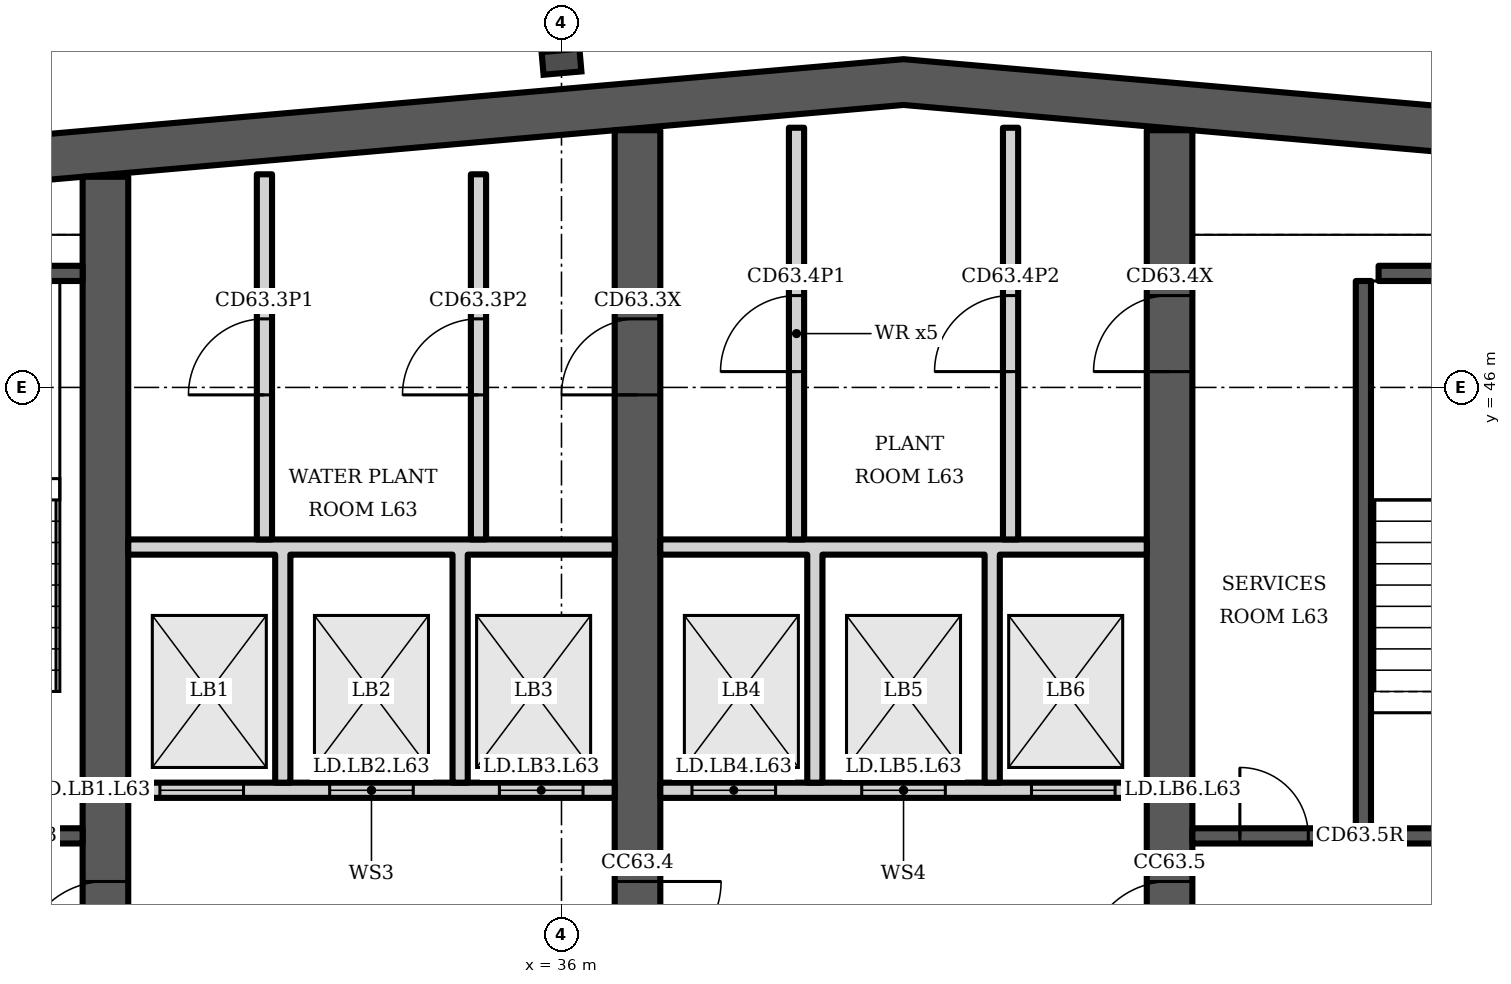
"""IFC4 building model, lengths in metres.
Left out: names, types, materials, properties, quantities, classifications, styles, units other than length and angle.
Written with IfcOpenShell. Run it as: python <this file> out.ifc"""

import sys

from ifc_helpers import new_model, si_unit, direction, frame, frame_2d, origin, origin_2d, place, context, subcontext, project, spatial, polyline, rectangle, i_section, outline, extrude, element, fill, save


model = new_model("IFC4")
c1 = context("Model", 3, precision=1e-05, world=origin(), true_north=direction((0.0, 1.0)))
c2 = subcontext(c1, "Body", "Model", "MODEL_VIEW")
j1 = project(units=[si_unit("LENGTHUNIT", "METRE"), si_unit("PLANEANGLEUNIT", "RADIAN")], contexts=[c1])
p1 = place(None, origin())
s1 = spatial("IfcSite", under=j1, at=p1, CompositionType="ELEMENT")
p2 = place(p1, origin())
s2 = spatial("IfcBuilding", under=s1, at=p2, CompositionType="ELEMENT")
p3 = place(p2, frame((0.0, 0.0, 250.3)))
s3 = spatial("IfcBuildingStorey", under=s2, at=p3, CompositionType="ELEMENT", Elevation=250.3)
p4 = place(p3, frame((0.0, 0.0, -0.0)))
e1 = element("IfcWall", 1, at=p4, inside=s3, PredefinedType="SHEAR", context=c2, shape_type="SweptSolid", body=[
    extrude(outline(polyline([(23.0, 48.185), (40.5, 49.716), (58.0, 48.185), (58.0, 48.787), (40.5, 50.318), (23.0, 48.787), (23.0, 48.185)])), origin(), (0.0, 0.0, 1.0), 3.6),
])
p5 = place(p3, frame((30.0, 34.6, 0.0), z_axis=(0.0, 0.0, 1.0), x_axis=(0.0, 1.0, 0.0)))
e2 = element("IfcWall", 2, at=p5, inside=s3, PredefinedType="SHEAR", context=c2, shape_type="SweptSolid", body=[
    extrude(rectangle(XDim=14.171, YDim=0.6, at=frame_2d((7.085, 0.0))), origin(), (0.0, 0.0, 1.0), 3.6),
])
p6 = place(p5, frame((3.8, 0.0, 0.0)))
e3 = element("IfcOpeningElement", 3, at=p6, cuts=e2, PredefinedType="OPENING", context=c2, shape_type="SweptSolid", body=[
    extrude(rectangle(XDim=1.1, YDim=2.1, at=frame_2d((0.55, 1.05))), frame((0.0, 0.31, 0.0), z_axis=(0.0, -1.0, 0.0), x_axis=(1.0, 0.0, 0.0)), (0.0, 0.0, 1.0), 0.62),
])
p7 = place(p3, frame((37.0, 34.6, 0.0), z_axis=(0.0, 0.0, 1.0), x_axis=(0.0, 1.0, 0.0)))
e4 = element("IfcWall", 4, at=p7, inside=s3, PredefinedType="SHEAR", context=c2, shape_type="SweptSolid", body=[
    extrude(rectangle(XDim=14.784, YDim=0.6, at=frame_2d((7.392, 0.0))), origin(), (0.0, 0.0, 1.0), 3.6),
])
p8 = place(p7, frame((11.302, 0.0, 0.0)))
e5 = element("IfcOpeningElement", 5, at=p8, cuts=e4, PredefinedType="OPENING", context=c2, shape_type="SweptSolid", body=[
    extrude(rectangle(XDim=1.0, YDim=2.1, at=frame_2d((0.5, 1.05))), frame((0.0, 0.31, 0.0), z_axis=(0.0, -1.0, 0.0), x_axis=(1.0, 0.0, 0.0)), (0.0, 0.0, 1.0), 0.62),
])
p9 = place(p7, frame((3.8, 0.0, 0.0)))
e6 = element("IfcOpeningElement", 6, at=p9, cuts=e4, PredefinedType="OPENING", context=c2, shape_type="SweptSolid", body=[
    extrude(rectangle(XDim=1.1, YDim=2.1, at=frame_2d((0.55, 1.05))), frame((0.0, 0.31, 0.0), z_axis=(0.0, -1.0, 0.0), x_axis=(1.0, 0.0, 0.0)), (0.0, 0.0, 1.0), 0.62),
])
p10 = place(p3, frame((44.0, 34.6, 0.0), z_axis=(0.0, 0.0, 1.0), x_axis=(0.0, 1.0, 0.0)))
e7 = element("IfcWall", 7, at=p10, inside=s3, PredefinedType="SHEAR", context=c2, shape_type="SweptSolid", body=[
    extrude(rectangle(XDim=14.784, YDim=0.6, at=frame_2d((7.392, 0.0))), origin(), (0.0, 0.0, 1.0), 3.6),
])
p11 = place(p10, frame((11.608, 0.0, 0.0)))
e8 = element("IfcOpeningElement", 8, at=p11, cuts=e7, PredefinedType="OPENING", context=c2, shape_type="SweptSolid", body=[
    extrude(rectangle(XDim=1.0, YDim=2.1, at=frame_2d((0.5, 1.05))), frame((0.0, 0.31, 0.0), z_axis=(0.0, -1.0, 0.0), x_axis=(1.0, 0.0, 0.0)), (0.0, 0.0, 1.0), 0.62),
])
p12 = place(p10, frame((3.8, 0.0, 0.0)))
e9 = element("IfcOpeningElement", 9, at=p12, cuts=e7, PredefinedType="OPENING", context=c2, shape_type="SweptSolid", body=[
    extrude(rectangle(XDim=1.1, YDim=2.1, at=frame_2d((0.55, 1.05))), frame((0.0, 0.31, 0.0), z_axis=(0.0, -1.0, 0.0), x_axis=(1.0, 0.0, 0.0)), (0.0, 0.0, 1.0), 0.62),
])
p13 = place(p3, frame((36.0, 50.285, 0.0), z_axis=(0.0, 0.0, 1.0), x_axis=(-0.087156, 0.996197, 0.0)))
e10 = element("IfcColumn", 10, at=p13, inside=s3, PredefinedType="COLUMN", context=c2, shape_type="SweptSolid", body=[
    extrude(i_section(OverallWidth=0.3, OverallDepth=0.5, WebThickness=0.014, FlangeThickness=0.028, FilletRadius=0.027, at=origin_2d()), origin(), (0.0, 0.0, 1.0), 3.6),
])
p14 = place(p3, frame((23.6, 40.1, 0.0), z_axis=(0.0, 0.0, 1.0), x_axis=(1.0, 0.0, 0.0)))
e11 = element("IfcWall", 11, at=p14, inside=s3, PredefinedType="SHEAR", context=c2, shape_type="SweptSolid", body=[
    extrude(rectangle(XDim=6.1, YDim=0.2, at=frame_2d((3.05, 0.0))), origin(), (0.0, 0.0, 1.0), 3.2),
])
p15 = place(p14, frame((3.325, 0.0, 0.0)))
e12 = element("IfcOpeningElement", 12, at=p15, cuts=e11, PredefinedType="OPENING", context=c2, shape_type="SweptSolid", body=[
    extrude(rectangle(XDim=1.2, YDim=2.1, at=frame_2d((0.6, 1.05))), frame((0.0, 0.11, 0.0), z_axis=(0.0, -1.0, 0.0), x_axis=(1.0, 0.0, 0.0)), (0.0, 0.0, 1.0), 0.22),
])
p16 = place(p14, frame((0.475, 0.0, 0.0)))
e13 = element("IfcOpeningElement", 13, at=p16, cuts=e11, PredefinedType="OPENING", context=c2, shape_type="SweptSolid", body=[
    extrude(rectangle(XDim=0.9, YDim=2.1, at=frame_2d((0.45, 1.05))), frame((0.0, 0.11, 0.0), z_axis=(0.0, -1.0, 0.0), x_axis=(1.0, 0.0, 0.0)), (0.0, 0.0, 1.0), 0.22),
])
p17 = place(p3, frame((25.75, 47.5, 0.0), z_axis=(0.0, 0.0, 1.0), x_axis=(1.0, 0.0, 0.0)))
e14 = element("IfcWall", 14, at=p17, inside=s3, PredefinedType="SHEAR", context=c2, shape_type="SweptSolid", body=[
    extrude(rectangle(XDim=3.95, YDim=0.2, at=frame_2d((1.975, 0.0))), origin(), (0.0, 0.0, 1.0), 3.2),
])
p18 = place(p3, frame((30.3, 40.7, 0.0), z_axis=(0.0, 0.0, 1.0), x_axis=(1.0, 0.0, 0.0)))
e15 = element("IfcWall", 15, at=p18, inside=s3, PredefinedType="PARTITIONING", context=c2, shape_type="SweptSolid", body=[
    extrude(rectangle(XDim=6.4, YDim=0.2, at=frame_2d((3.2, 0.0))), origin(), (0.0, 0.0, 1.0), 3.2),
])
p19 = place(p18, frame((0.417, 0.0, 0.0)))
e16 = element("IfcOpeningElement", 16, at=p19, cuts=e15, PredefinedType="OPENING", context=c2, shape_type="SweptSolid", body=[
    extrude(rectangle(XDim=1.1, YDim=2.1, at=frame_2d((0.55, 1.05))), frame((0.0, 0.11, 0.0), z_axis=(0.0, -1.0, 0.0), x_axis=(1.0, 0.0, 0.0)), (0.0, 0.0, 1.0), 0.22),
])
p20 = place(p18, frame((2.65, 0.0, 0.0)))
e17 = element("IfcOpeningElement", 17, at=p20, cuts=e15, PredefinedType="OPENING", context=c2, shape_type="SweptSolid", body=[
    extrude(rectangle(XDim=1.1, YDim=2.1, at=frame_2d((0.55, 1.05))), frame((0.0, 0.11, 0.0), z_axis=(0.0, -1.0, 0.0), x_axis=(1.0, 0.0, 0.0)), (0.0, 0.0, 1.0), 0.22),
])
p21 = place(p18, frame((4.883, 0.0, 0.0)))
e18 = element("IfcOpeningElement", 18, at=p21, cuts=e15, PredefinedType="OPENING", context=c2, shape_type="SweptSolid", body=[
    extrude(rectangle(XDim=1.1, YDim=2.1, at=frame_2d((0.55, 1.05))), frame((0.0, 0.11, 0.0), z_axis=(0.0, -1.0, 0.0), x_axis=(1.0, 0.0, 0.0)), (0.0, 0.0, 1.0), 0.22),
])
p22 = place(p3, frame((0.0, 0.0, -0.0)))
e19 = element("IfcWall", 19, at=p22, inside=s3, PredefinedType="PARTITIONING", context=c2, shape_type="SweptSolid", body=[
    extrude(outline(polyline([(32.433, 40.8), (32.233, 40.8), (32.233, 43.8), (30.3, 43.8), (30.3, 44.0), (36.7, 44.0), (36.7, 43.8), (34.767, 43.8), (34.767, 40.8), (34.567, 40.8), (34.567, 43.8), (32.433, 43.8), (32.433, 40.8)])), origin(), (0.0, 0.0, 1.0), 3.2),
])
p23 = place(p3, frame((32.092, 44.0, 0.0), z_axis=(0.0, 0.0, 1.0), x_axis=(0.0, 1.0, 0.0)))
e20 = element("IfcWall", 20, at=p23, inside=s3, PredefinedType="PARTITIONING", context=c2, shape_type="SweptSolid", body=[
    extrude(rectangle(XDim=4.804, YDim=0.2, at=frame_2d((2.402, 0.0))), origin(), (0.0, 0.0, 1.0), 3.2),
])
p24 = place(p23, frame((1.902, 0.0, 0.0)))
e21 = element("IfcOpeningElement", 21, at=p24, cuts=e20, PredefinedType="OPENING", context=c2, shape_type="SweptSolid", body=[
    extrude(rectangle(XDim=1.0, YDim=2.1, at=frame_2d((0.5, 1.05))), frame((0.0, 0.11, 0.0), z_axis=(0.0, -1.0, 0.0), x_axis=(1.0, 0.0, 0.0)), (0.0, 0.0, 1.0), 0.22),
])
p25 = place(p3, frame((34.908, 44.0, 0.0), z_axis=(0.0, 0.0, 1.0), x_axis=(0.0, 1.0, 0.0)))
e22 = element("IfcWall", 22, at=p25, inside=s3, PredefinedType="PARTITIONING", context=c2, shape_type="SweptSolid", body=[
    extrude(rectangle(XDim=4.804, YDim=0.2, at=frame_2d((2.402, 0.0))), origin(), (0.0, 0.0, 1.0), 3.2),
])
p26 = place(p25, frame((1.902, 0.0, 0.0)))
e23 = element("IfcOpeningElement", 23, at=p26, cuts=e22, PredefinedType="OPENING", context=c2, shape_type="SweptSolid", body=[
    extrude(rectangle(XDim=1.0, YDim=2.1, at=frame_2d((0.5, 1.05))), frame((0.0, 0.11, 0.0), z_axis=(0.0, -1.0, 0.0), x_axis=(1.0, 0.0, 0.0)), (0.0, 0.0, 1.0), 0.22),
])
p27 = place(p3, frame((37.3, 40.7, 0.0), z_axis=(0.0, 0.0, 1.0), x_axis=(1.0, 0.0, 0.0)))
e24 = element("IfcWall", 24, at=p27, inside=s3, PredefinedType="PARTITIONING", context=c2, shape_type="SweptSolid", body=[
    extrude(rectangle(XDim=6.4, YDim=0.2, at=frame_2d((3.2, 0.0))), origin(), (0.0, 0.0, 1.0), 3.2),
])
p28 = place(p27, frame((0.417, 0.0, 0.0)))
e25 = element("IfcOpeningElement", 25, at=p28, cuts=e24, PredefinedType="OPENING", context=c2, shape_type="SweptSolid", body=[
    extrude(rectangle(XDim=1.1, YDim=2.1, at=frame_2d((0.55, 1.05))), frame((0.0, 0.11, 0.0), z_axis=(0.0, -1.0, 0.0), x_axis=(1.0, 0.0, 0.0)), (0.0, 0.0, 1.0), 0.22),
])
p29 = place(p27, frame((2.65, 0.0, 0.0)))
e26 = element("IfcOpeningElement", 26, at=p29, cuts=e24, PredefinedType="OPENING", context=c2, shape_type="SweptSolid", body=[
    extrude(rectangle(XDim=1.1, YDim=2.1, at=frame_2d((0.55, 1.05))), frame((0.0, 0.11, 0.0), z_axis=(0.0, -1.0, 0.0), x_axis=(1.0, 0.0, 0.0)), (0.0, 0.0, 1.0), 0.22),
])
p30 = place(p27, frame((4.883, 0.0, 0.0)))
e27 = element("IfcOpeningElement", 27, at=p30, cuts=e24, PredefinedType="OPENING", context=c2, shape_type="SweptSolid", body=[
    extrude(rectangle(XDim=1.1, YDim=2.1, at=frame_2d((0.55, 1.05))), frame((0.0, 0.11, 0.0), z_axis=(0.0, -1.0, 0.0), x_axis=(1.0, 0.0, 0.0)), (0.0, 0.0, 1.0), 0.22),
])
p31 = place(p3, frame((0.0, 0.0, -0.0)))
e28 = element("IfcWall", 28, at=p31, inside=s3, PredefinedType="PARTITIONING", context=c2, shape_type="SweptSolid", body=[
    extrude(outline(polyline([(39.433, 40.8), (39.233, 40.8), (39.233, 43.8), (37.3, 43.8), (37.3, 44.0), (43.7, 44.0), (43.7, 43.8), (41.767, 43.8), (41.767, 40.8), (41.567, 40.8), (41.567, 43.8), (39.433, 43.8), (39.433, 40.8)])), origin(), (0.0, 0.0, 1.0), 3.2),
])
p32 = place(p3, frame((39.092, 44.0, 0.0), z_axis=(0.0, 0.0, 1.0), x_axis=(0.0, 1.0, 0.0)))
e29 = element("IfcWall", 29, at=p32, inside=s3, PredefinedType="PARTITIONING", context=c2, shape_type="SweptSolid", body=[
    extrude(rectangle(XDim=5.416, YDim=0.2, at=frame_2d((2.708, 0.0))), origin(), (0.0, 0.0, 1.0), 3.2),
])
p33 = place(p32, frame((2.208, 0.0, 0.0)))
e30 = element("IfcOpeningElement", 30, at=p33, cuts=e29, PredefinedType="OPENING", context=c2, shape_type="SweptSolid", body=[
    extrude(rectangle(XDim=1.0, YDim=2.1, at=frame_2d((0.5, 1.05))), frame((0.0, 0.11, 0.0), z_axis=(0.0, -1.0, 0.0), x_axis=(1.0, 0.0, 0.0)), (0.0, 0.0, 1.0), 0.22),
])
p34 = place(p3, frame((41.908, 44.0, 0.0), z_axis=(0.0, 0.0, 1.0), x_axis=(0.0, 1.0, 0.0)))
e31 = element("IfcWall", 31, at=p34, inside=s3, PredefinedType="PARTITIONING", context=c2, shape_type="SweptSolid", body=[
    extrude(rectangle(XDim=5.416, YDim=0.2, at=frame_2d((2.708, 0.0))), origin(), (0.0, 0.0, 1.0), 3.2),
])
p35 = place(p34, frame((2.208, 0.0, 0.0)))
e32 = element("IfcOpeningElement", 32, at=p35, cuts=e31, PredefinedType="OPENING", context=c2, shape_type="SweptSolid", body=[
    extrude(rectangle(XDim=1.0, YDim=2.1, at=frame_2d((0.5, 1.05))), frame((0.0, 0.11, 0.0), z_axis=(0.0, -1.0, 0.0), x_axis=(1.0, 0.0, 0.0)), (0.0, 0.0, 1.0), 0.22),
])
p36 = place(p3, frame((44.3, 40.1, 0.0), z_axis=(0.0, 0.0, 1.0), x_axis=(1.0, 0.0, 0.0)))
e33 = element("IfcWall", 33, at=p36, inside=s3, PredefinedType="SHEAR", context=c2, shape_type="SweptSolid", body=[
    extrude(rectangle(XDim=6.4, YDim=0.2, at=frame_2d((3.2, 0.0))), origin(), (0.0, 0.0, 1.0), 3.2),
])
p37 = place(p36, frame((3.625, 0.0, 0.0)))
e34 = element("IfcOpeningElement", 34, at=p37, cuts=e33, PredefinedType="OPENING", context=c2, shape_type="SweptSolid", body=[
    extrude(rectangle(XDim=1.2, YDim=2.1, at=frame_2d((0.6, 1.05))), frame((0.0, 0.11, 0.0), z_axis=(0.0, -1.0, 0.0), x_axis=(1.0, 0.0, 0.0)), (0.0, 0.0, 1.0), 0.22),
])
p38 = place(p36, frame((0.625, 0.0, 0.0)))
e35 = element("IfcOpeningElement", 35, at=p38, cuts=e33, PredefinedType="OPENING", context=c2, shape_type="SweptSolid", body=[
    extrude(rectangle(XDim=0.9, YDim=2.1, at=frame_2d((0.45, 1.05))), frame((0.0, 0.11, 0.0), z_axis=(0.0, -1.0, 0.0), x_axis=(1.0, 0.0, 0.0)), (0.0, 0.0, 1.0), 0.22),
])
p39 = place(p3, frame((46.55, 40.2, 0.0), z_axis=(0.0, 0.0, 1.0), x_axis=(0.0, 1.0, 0.0)))
e36 = element("IfcWall", 36, at=p39, inside=s3, PredefinedType="SHEAR", context=c2, shape_type="SweptSolid", body=[
    extrude(rectangle(XDim=7.2, YDim=0.2, at=frame_2d((3.6, 0.0))), origin(), (0.0, 0.0, 1.0), 3.2),
])
p40 = place(p3, frame((46.75, 47.5, 0.0), z_axis=(0.0, 0.0, 1.0), x_axis=(1.0, 0.0, 0.0)))
e37 = element("IfcWall", 37, at=p40, inside=s3, PredefinedType="SHEAR", context=c2, shape_type="SweptSolid", body=[
    extrude(rectangle(XDim=3.95, YDim=0.2, at=frame_2d((1.975, 0.0))), origin(), (0.0, 0.0, 1.0), 3.2),
])
p41 = place(p19, origin())
e38 = element("IfcDoor", 38, at=p41, inside=s3, OperationType="DOUBLE_DOOR_SLIDING", PredefinedType="DOOR", context=c2, shape_type="SweptSolid", body=[
    extrude(rectangle(XDim=1.1, YDim=2.1, at=frame_2d((0.55, 1.05))), frame((0.0, 0.025, 0.0), z_axis=(0.0, -1.0, 0.0), x_axis=(1.0, 0.0, 0.0)), (0.0, 0.0, 1.0), 0.05),
])
fill(e16, e38)
p42 = place(p20, origin())
e39 = element("IfcDoor", 39, at=p42, inside=s3, OperationType="DOUBLE_DOOR_SLIDING", PredefinedType="DOOR", context=c2, shape_type="SweptSolid", body=[
    extrude(rectangle(XDim=1.1, YDim=2.1, at=frame_2d((0.55, 1.05))), frame((0.0, 0.025, 0.0), z_axis=(0.0, -1.0, 0.0), x_axis=(1.0, 0.0, 0.0)), (0.0, 0.0, 1.0), 0.05),
])
fill(e17, e39)
p43 = place(p21, origin())
e40 = element("IfcDoor", 40, at=p43, inside=s3, OperationType="DOUBLE_DOOR_SLIDING", PredefinedType="DOOR", context=c2, shape_type="SweptSolid", body=[
    extrude(rectangle(XDim=1.1, YDim=2.1, at=frame_2d((0.55, 1.05))), frame((0.0, 0.025, 0.0), z_axis=(0.0, -1.0, 0.0), x_axis=(1.0, 0.0, 0.0)), (0.0, 0.0, 1.0), 0.05),
])
fill(e18, e40)
p44 = place(p24, origin())
e41 = element("IfcDoor", 41, at=p44, inside=s3, OperationType="SINGLE_SWING_LEFT", PredefinedType="DOOR", context=c2, shape_type="SweptSolid", body=[
    extrude(rectangle(XDim=1.0, YDim=2.1, at=frame_2d((0.5, 1.05))), frame((0.0, 0.025, 0.0), z_axis=(0.0, -1.0, 0.0), x_axis=(1.0, 0.0, 0.0)), (0.0, 0.0, 1.0), 0.05),
])
fill(e21, e41)
p45 = place(p26, origin())
e42 = element("IfcDoor", 42, at=p45, inside=s3, OperationType="SINGLE_SWING_LEFT", PredefinedType="DOOR", context=c2, shape_type="SweptSolid", body=[
    extrude(rectangle(XDim=1.0, YDim=2.1, at=frame_2d((0.5, 1.05))), frame((0.0, 0.025, 0.0), z_axis=(0.0, -1.0, 0.0), x_axis=(1.0, 0.0, 0.0)), (0.0, 0.0, 1.0), 0.05),
])
fill(e23, e42)
p46 = place(p8, origin())
e43 = element("IfcDoor", 43, at=p46, inside=s3, OperationType="SINGLE_SWING_LEFT", PredefinedType="DOOR", context=c2, shape_type="SweptSolid", body=[
    extrude(rectangle(XDim=1.0, YDim=2.1, at=frame_2d((0.5, 1.05))), frame((0.0, 0.025, 0.0), z_axis=(0.0, -1.0, 0.0), x_axis=(1.0, 0.0, 0.0)), (0.0, 0.0, 1.0), 0.05),
])
fill(e5, e43)
p47 = place(p28, origin())
e44 = element("IfcDoor", 44, at=p47, inside=s3, OperationType="DOUBLE_DOOR_SLIDING", PredefinedType="DOOR", context=c2, shape_type="SweptSolid", body=[
    extrude(rectangle(XDim=1.1, YDim=2.1, at=frame_2d((0.55, 1.05))), frame((0.0, 0.025, 0.0), z_axis=(0.0, -1.0, 0.0), x_axis=(1.0, 0.0, 0.0)), (0.0, 0.0, 1.0), 0.05),
])
fill(e25, e44)
p48 = place(p29, origin())
e45 = element("IfcDoor", 45, at=p48, inside=s3, OperationType="DOUBLE_DOOR_SLIDING", PredefinedType="DOOR", context=c2, shape_type="SweptSolid", body=[
    extrude(rectangle(XDim=1.1, YDim=2.1, at=frame_2d((0.55, 1.05))), frame((0.0, 0.025, 0.0), z_axis=(0.0, -1.0, 0.0), x_axis=(1.0, 0.0, 0.0)), (0.0, 0.0, 1.0), 0.05),
])
fill(e26, e45)
p49 = place(p30, origin())
e46 = element("IfcDoor", 46, at=p49, inside=s3, OperationType="DOUBLE_DOOR_SLIDING", PredefinedType="DOOR", context=c2, shape_type="SweptSolid", body=[
    extrude(rectangle(XDim=1.1, YDim=2.1, at=frame_2d((0.55, 1.05))), frame((0.0, 0.025, 0.0), z_axis=(0.0, -1.0, 0.0), x_axis=(1.0, 0.0, 0.0)), (0.0, 0.0, 1.0), 0.05),
])
fill(e27, e46)
p50 = place(p33, origin())
e47 = element("IfcDoor", 47, at=p50, inside=s3, OperationType="SINGLE_SWING_LEFT", PredefinedType="DOOR", context=c2, shape_type="SweptSolid", body=[
    extrude(rectangle(XDim=1.0, YDim=2.1, at=frame_2d((0.5, 1.05))), frame((0.0, 0.025, 0.0), z_axis=(0.0, -1.0, 0.0), x_axis=(1.0, 0.0, 0.0)), (0.0, 0.0, 1.0), 0.05),
])
fill(e30, e47)
p51 = place(p35, origin())
e48 = element("IfcDoor", 48, at=p51, inside=s3, OperationType="SINGLE_SWING_LEFT", PredefinedType="DOOR", context=c2, shape_type="SweptSolid", body=[
    extrude(rectangle(XDim=1.0, YDim=2.1, at=frame_2d((0.5, 1.05))), frame((0.0, 0.025, 0.0), z_axis=(0.0, -1.0, 0.0), x_axis=(1.0, 0.0, 0.0)), (0.0, 0.0, 1.0), 0.05),
])
fill(e32, e48)
p52 = place(p11, origin())
e49 = element("IfcDoor", 49, at=p52, inside=s3, OperationType="SINGLE_SWING_LEFT", PredefinedType="DOOR", context=c2, shape_type="SweptSolid", body=[
    extrude(rectangle(XDim=1.0, YDim=2.1, at=frame_2d((0.5, 1.05))), frame((0.0, 0.025, 0.0), z_axis=(0.0, -1.0, 0.0), x_axis=(1.0, 0.0, 0.0)), (0.0, 0.0, 1.0), 0.05),
])
fill(e8, e49)
p53 = place(p38, origin())
e50 = element("IfcDoor", 50, at=p53, inside=s3, OperationType="SINGLE_SWING_LEFT", PredefinedType="DOOR", context=c2, shape_type="SweptSolid", body=[
    extrude(rectangle(XDim=0.9, YDim=2.1, at=frame_2d((0.45, 1.05))), frame((0.0, 0.025, 0.0), z_axis=(0.0, -1.0, 0.0), x_axis=(1.0, 0.0, 0.0)), (0.0, 0.0, 1.0), 0.05),
])
fill(e35, e50)
p54 = place(p6, origin())
e51 = element("IfcDoor", 51, at=p54, inside=s3, OperationType="SINGLE_SWING_LEFT", PredefinedType="DOOR", context=c2, shape_type="SweptSolid", body=[
    extrude(rectangle(XDim=1.1, YDim=2.1, at=frame_2d((0.55, 1.05))), frame((0.0, 0.025, 0.0), z_axis=(0.0, -1.0, 0.0), x_axis=(1.0, 0.0, 0.0)), (0.0, 0.0, 1.0), 0.05),
])
fill(e3, e51)
p55 = place(p9, origin())
e52 = element("IfcDoor", 52, at=p55, inside=s3, OperationType="SINGLE_SWING_RIGHT", PredefinedType="DOOR", context=c2, shape_type="SweptSolid", body=[
    extrude(rectangle(XDim=1.1, YDim=2.1, at=frame_2d((0.55, 1.05))), frame((0.0, 0.025, 0.0), z_axis=(0.0, -1.0, 0.0), x_axis=(1.0, 0.0, 0.0)), (0.0, 0.0, 1.0), 0.05),
])
fill(e6, e52)
p56 = place(p12, origin())
e53 = element("IfcDoor", 53, at=p56, inside=s3, OperationType="SINGLE_SWING_LEFT", PredefinedType="DOOR", context=c2, shape_type="SweptSolid", body=[
    extrude(rectangle(XDim=1.1, YDim=2.1, at=frame_2d((0.55, 1.05))), frame((0.0, 0.025, 0.0), z_axis=(0.0, -1.0, 0.0), x_axis=(1.0, 0.0, 0.0)), (0.0, 0.0, 1.0), 0.05),
])
fill(e9, e53)
save(model, sys.argv[1])
